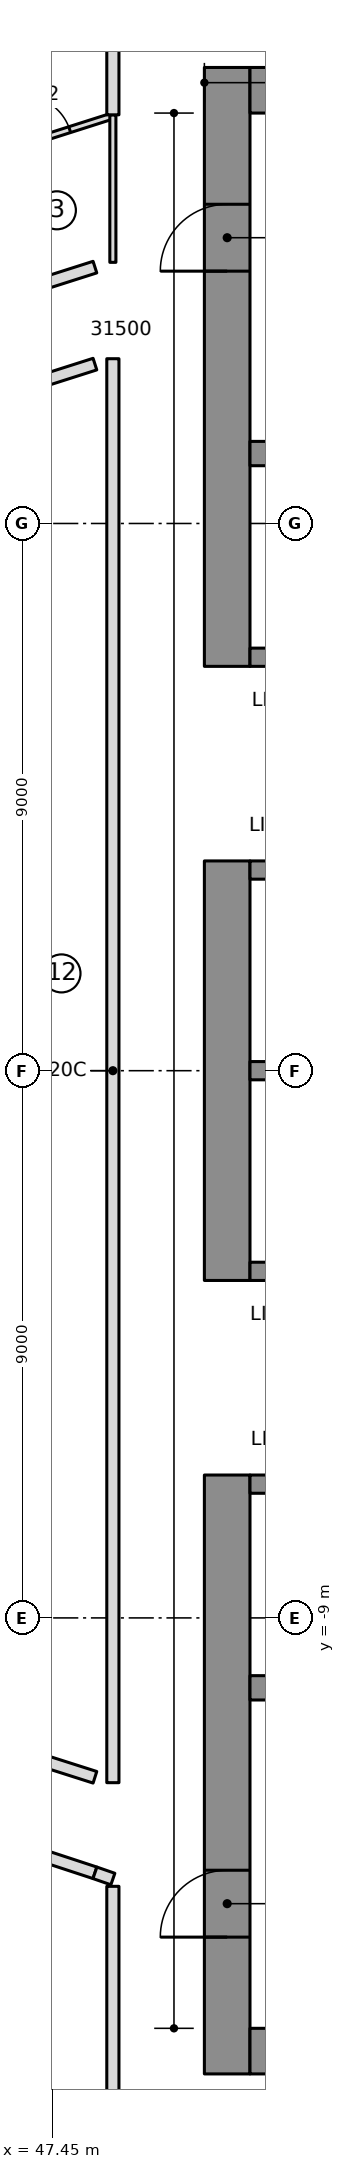
"""IFC4 building model, lengths in metres.
Left out: names, types, materials, properties, quantities, classifications, styles, units other than length and angle.
Written with IfcOpenShell. Run it as: python <this file> out.ifc"""

import sys

from ifc_helpers import new_model, si_unit, direction, frame, frame_2d, origin, place, context, subcontext, project, spatial, rectangle, extrude, element, fill, save


model = new_model("IFC4")
c1 = context("Model", 3, precision=1e-05, world=origin(), true_north=direction((0.0, 1.0)))
c2 = subcontext(c1, "Body", "Model", "MODEL_VIEW")
j1 = project(units=[si_unit("LENGTHUNIT", "METRE"), si_unit("PLANEANGLEUNIT", "RADIAN")], contexts=[c1])
p1 = place(None, origin())
s1 = spatial("IfcSite", under=j1, at=p1, CompositionType="ELEMENT")
p2 = place(p1, origin())
s2 = spatial("IfcBuilding", under=s1, at=p2, CompositionType="ELEMENT")
p3 = place(p2, frame((0.0, 0.0, 175.5)))
s3 = spatial("IfcBuildingStorey", under=s2, at=p3, CompositionType="ELEMENT", Elevation=175.5)
p4 = place(p3, frame((50.325, 6.65, 0.0), z_axis=(0.0, 0.0, 1.0), x_axis=(0.0, 1.0, 0.0)))
e1 = element("IfcWall", 1, at=p4, inside=s3, PredefinedType="SHEAR", context=c2, shape_type="SweptSolid", body=[
    extrude(rectangle(XDim=9.85, YDim=0.75, at=frame_2d((4.925, 0.0))), origin(), (0.0, 0.0, 1.0), 3.55),
])
p5 = place(p4, frame((6.5, 0.0, 0.0)))
e2 = element("IfcOpeningElement", 2, at=p5, cuts=e1, PredefinedType="OPENING", context=c2, shape_type="SweptSolid", body=[
    extrude(rectangle(XDim=1.1, YDim=2.1, at=frame_2d((0.55, 1.05))), frame((0.0, 0.385, 0.0), z_axis=(0.0, -1.0, 0.0), x_axis=(1.0, 0.0, 0.0)), (0.0, 0.0, 1.0), 0.77),
])
p6 = place(p3, frame((50.325, -3.45, 0.0), z_axis=(0.0, 0.0, 1.0), x_axis=(0.0, 1.0, 0.0)))
e3 = element("IfcWall", 3, at=p6, inside=s3, PredefinedType="SHEAR", context=c2, shape_type="SweptSolid", body=[
    extrude(rectangle(XDim=6.9, YDim=0.75, at=frame_2d((3.45, 0.0))), origin(), (0.0, 0.0, 1.0), 3.55),
])
p7 = place(p3, frame((50.325, -16.5, 0.0), z_axis=(0.0, 0.0, 1.0), x_axis=(0.0, 1.0, 0.0)))
e4 = element("IfcWall", 4, at=p7, inside=s3, PredefinedType="SHEAR", context=c2, shape_type="SweptSolid", body=[
    extrude(rectangle(XDim=9.85, YDim=0.75, at=frame_2d((4.925, 0.0))), origin(), (0.0, 0.0, 1.0), 3.55),
])
p8 = place(p7, frame((2.25, 0.0, 0.0)))
e5 = element("IfcOpeningElement", 5, at=p8, cuts=e4, PredefinedType="OPENING", context=c2, shape_type="SweptSolid", body=[
    extrude(rectangle(XDim=1.1, YDim=2.1, at=frame_2d((0.55, 1.05))), frame((0.0, 0.385, 0.0), z_axis=(0.0, -1.0, 0.0), x_axis=(1.0, 0.0, 0.0)), (0.0, 0.0, 1.0), 0.77),
])
for number, where, z_axis, x_axis in (
    (6, (50.7, 16.125, 0.0), (0.0, 0.0, 1.0), (1.0, 0.0, 0.0)),
    (7, (50.7, -16.125, 0.0), (0.0, 0.0, 1.0), (1.0, 0.0, 0.0)),
):
    element("IfcWall", number, at=place(p3, frame(where, z_axis=z_axis, x_axis=x_axis)), inside=s3, PredefinedType="SHEAR", context=c2, shape_type="SweptSolid", body=[
        extrude(rectangle(XDim=13.77, YDim=0.75, at=frame_2d((6.885, 0.0))), origin(), (0.0, 0.0, 1.0), 3.55),
    ])
p9 = place(p3, frame((50.7, 10.15, 0.0), z_axis=(0.0, 0.0, 1.0), x_axis=(1.0, 0.0, 0.0)))
e8 = element("IfcWall", 8, at=p9, inside=s3, PredefinedType="SHEAR", context=c2, shape_type="SweptSolid", body=[
    extrude(rectangle(XDim=13.02, YDim=0.4, at=frame_2d((6.51, 0.0))), origin(), (0.0, 0.0, 1.0), 3.55),
])
p10 = place(p9, frame((0.7, 0.0, 0.0)))
e9 = element("IfcOpeningElement", 9, at=p10, cuts=e8, PredefinedType="OPENING", context=c2, shape_type="SweptSolid", body=[
    extrude(rectangle(XDim=1.1, YDim=2.1, at=frame_2d((0.55, 1.05))), frame((0.0, 0.21, 0.0), z_axis=(0.0, -1.0, 0.0), x_axis=(1.0, 0.0, 0.0)), (0.0, 0.0, 1.0), 0.42),
])
p11 = place(p9, frame((3.5, 0.0, 0.0)))
e10 = element("IfcOpeningElement", 10, at=p11, cuts=e8, PredefinedType="OPENING", context=c2, shape_type="SweptSolid", body=[
    extrude(rectangle(XDim=1.1, YDim=2.1, at=frame_2d((0.55, 1.05))), frame((0.0, 0.21, 0.0), z_axis=(0.0, -1.0, 0.0), x_axis=(1.0, 0.0, 0.0)), (0.0, 0.0, 1.0), 0.42),
])
p12 = place(p3, frame((50.7, -10.15, 0.0), z_axis=(0.0, 0.0, 1.0), x_axis=(1.0, 0.0, 0.0)))
e11 = element("IfcWall", 11, at=p12, inside=s3, PredefinedType="SHEAR", context=c2, shape_type="SweptSolid", body=[
    extrude(rectangle(XDim=13.02, YDim=0.4, at=frame_2d((6.51, 0.0))), origin(), (0.0, 0.0, 1.0), 3.55),
])
p13 = place(p3, frame((50.7, 0.0, 0.0), z_axis=(0.0, 0.0, 1.0), x_axis=(1.0, 0.0, 0.0)))
e12 = element("IfcWall", 12, at=p13, inside=s3, PredefinedType="SHEAR", context=c2, shape_type="SweptSolid", body=[
    extrude(rectangle(XDim=10.9, YDim=0.3, at=frame_2d((5.45, 0.0))), origin(), (0.0, 0.0, 1.0), 3.55),
])
p14 = place(p3, frame((50.7, 3.3, 0.0), z_axis=(0.0, 0.0, 1.0), x_axis=(1.0, 0.0, 0.0)))
e13 = element("IfcWall", 13, at=p14, inside=s3, PredefinedType="SHEAR", context=c2, shape_type="SweptSolid", body=[
    extrude(rectangle(XDim=10.9, YDim=0.3, at=frame_2d((5.45, 0.0))), origin(), (0.0, 0.0, 1.0), 3.55),
])
p15 = place(p14, frame((0.7, 0.0, 0.0)))
e14 = element("IfcOpeningElement", 14, at=p15, cuts=e13, PredefinedType="OPENING", context=c2, shape_type="SweptSolid", body=[
    extrude(rectangle(XDim=1.1, YDim=2.1, at=frame_2d((0.55, 1.05))), frame((0.0, 0.16, 0.0), z_axis=(0.0, -1.0, 0.0), x_axis=(1.0, 0.0, 0.0)), (0.0, 0.0, 1.0), 0.32),
])
p16 = place(p14, frame((3.5, 0.0, 0.0)))
e15 = element("IfcOpeningElement", 15, at=p16, cuts=e13, PredefinedType="OPENING", context=c2, shape_type="SweptSolid", body=[
    extrude(rectangle(XDim=1.1, YDim=2.1, at=frame_2d((0.55, 1.05))), frame((0.0, 0.16, 0.0), z_axis=(0.0, -1.0, 0.0), x_axis=(1.0, 0.0, 0.0)), (0.0, 0.0, 1.0), 0.32),
])
p17 = place(p14, frame((6.3, 0.0, 0.0)))
e16 = element("IfcOpeningElement", 16, at=p17, cuts=e13, PredefinedType="OPENING", context=c2, shape_type="SweptSolid", body=[
    extrude(rectangle(XDim=1.1, YDim=2.1, at=frame_2d((0.55, 1.05))), frame((0.0, 0.16, 0.0), z_axis=(0.0, -1.0, 0.0), x_axis=(1.0, 0.0, 0.0)), (0.0, 0.0, 1.0), 0.32),
])
p18 = place(p14, frame((9.1, 0.0, 0.0)))
e17 = element("IfcOpeningElement", 17, at=p18, cuts=e13, PredefinedType="OPENING", context=c2, shape_type="SweptSolid", body=[
    extrude(rectangle(XDim=1.1, YDim=2.1, at=frame_2d((0.55, 1.05))), frame((0.0, 0.16, 0.0), z_axis=(0.0, -1.0, 0.0), x_axis=(1.0, 0.0, 0.0)), (0.0, 0.0, 1.0), 0.32),
])
p19 = place(p3, frame((50.7, 6.8, 0.0), z_axis=(0.0, 0.0, 1.0), x_axis=(1.0, 0.0, 0.0)))
e18 = element("IfcWall", 18, at=p19, inside=s3, PredefinedType="SHEAR", context=c2, shape_type="SweptSolid", body=[
    extrude(rectangle(XDim=10.9, YDim=0.3, at=frame_2d((5.45, 0.0))), origin(), (0.0, 0.0, 1.0), 3.55),
])
p20 = place(p3, frame((50.7, -3.3, 0.0), z_axis=(0.0, 0.0, 1.0), x_axis=(1.0, 0.0, 0.0)))
e19 = element("IfcWall", 19, at=p20, inside=s3, PredefinedType="SHEAR", context=c2, shape_type="SweptSolid", body=[
    extrude(rectangle(XDim=10.9, YDim=0.3, at=frame_2d((5.45, 0.0))), origin(), (0.0, 0.0, 1.0), 3.55),
])
p21 = place(p20, frame((9.1, 0.0, 0.0)))
e20 = element("IfcOpeningElement", 20, at=p21, cuts=e19, PredefinedType="OPENING", context=c2, shape_type="SweptSolid", body=[
    extrude(rectangle(XDim=1.1, YDim=2.1, at=frame_2d((0.55, 1.05))), frame((0.0, 0.16, 0.0), z_axis=(0.0, -1.0, 0.0), x_axis=(1.0, 0.0, 0.0)), (0.0, 0.0, 1.0), 0.32),
])
p22 = place(p3, frame((50.7, -6.8, 0.0), z_axis=(0.0, 0.0, 1.0), x_axis=(1.0, 0.0, 0.0)))
e21 = element("IfcWall", 21, at=p22, inside=s3, PredefinedType="SHEAR", context=c2, shape_type="SweptSolid", body=[
    extrude(rectangle(XDim=10.9, YDim=0.3, at=frame_2d((5.45, 0.0))), origin(), (0.0, 0.0, 1.0), 3.55),
])
p23 = place(p22, frame((6.3, 0.0, 0.0)))
e22 = element("IfcOpeningElement", 22, at=p23, cuts=e21, PredefinedType="OPENING", context=c2, shape_type="SweptSolid", body=[
    extrude(rectangle(XDim=1.1, YDim=2.1, at=frame_2d((0.55, 1.05))), frame((0.0, 0.16, 0.0), z_axis=(0.0, -1.0, 0.0), x_axis=(1.0, 0.0, 0.0)), (0.0, 0.0, 1.0), 0.32),
])
p24 = place(p22, frame((9.1, 0.0, 0.0)))
e23 = element("IfcOpeningElement", 23, at=p24, cuts=e21, PredefinedType="OPENING", context=c2, shape_type="SweptSolid", body=[
    extrude(rectangle(XDim=1.1, YDim=2.1, at=frame_2d((0.55, 1.05))), frame((0.0, 0.16, 0.0), z_axis=(0.0, -1.0, 0.0), x_axis=(1.0, 0.0, 0.0)), (0.0, 0.0, 1.0), 0.32),
])
p25 = place(p3, frame((46.259, 15.007, 0.0), z_axis=(0.0, 0.0, 1.0), x_axis=(0.952731222045, 0.303814447552, 0.0)))
e24 = element("IfcWall", 24, at=p25, inside=s3, PredefinedType="PARTITIONING", context=c2, shape_type="SweptSolid", body=[
    extrude(rectangle(XDim=2.277, YDim=0.1, at=frame_2d((1.138, 0.0))), origin(), (0.0, 0.0, 1.0), 3.25),
])
p26 = place(p25, frame((0.75, 0.0, 0.0)))
e25 = element("IfcOpeningElement", 25, at=p26, cuts=e24, PredefinedType="OPENING", context=c2, shape_type="SweptSolid", body=[
    extrude(rectangle(XDim=0.8, YDim=2.1, at=frame_2d((0.4, 1.05))), frame((0.0, 0.06, 0.0), z_axis=(0.0, -1.0, 0.0), x_axis=(1.0, 0.0, 0.0)), (0.0, 0.0, 1.0), 0.12),
])
p27 = place(p3, frame((48.445, 15.721, 0.0), z_axis=(0.0, 0.0, 1.0), x_axis=(0.0, -1.0, 0.0)))
e26 = element("IfcWall", 26, at=p27, inside=s3, PredefinedType="PARTITIONING", context=c2, shape_type="SweptSolid", body=[
    extrude(rectangle(XDim=2.426, YDim=0.1, at=frame_2d((1.213, 0.0))), origin(), (0.0, 0.0, 1.0), 3.25),
])
p28 = place(p3, frame((48.15, 13.217, 0.0), z_axis=(0.0, 0.0, 1.0), x_axis=(-0.952731090451, -0.303814860215, 0.0)))
e27 = element("IfcWall", 27, at=p28, inside=s3, PredefinedType="PARTITIONING", context=c2, shape_type="SweptSolid", body=[
    extrude(rectangle(XDim=1.088, YDim=0.2, at=frame_2d((0.544, 0.0))), origin(), (0.0, 0.0, 1.0), 3.25),
])
p29 = place(p3, frame((43.026, -11.507, 0.0), z_axis=(0.0, 0.0, 1.0), x_axis=(0.949951949432, -0.312396052744, 0.0)))
e28 = element("IfcWall", 28, at=p29, inside=s3, PredefinedType="PARTITIONING", context=c2, shape_type="SweptSolid", body=[
    extrude(rectangle(XDim=5.394, YDim=0.2, at=frame_2d((2.697, 0.0))), origin(), (0.0, 0.0, 1.0), 3.25),
])
p30 = place(p29, frame((3.05, 0.0, 0.0)))
e29 = element("IfcOpeningElement", 29, at=p30, cuts=e28, PredefinedType="OPENING", context=c2, shape_type="SweptSolid", body=[
    extrude(rectangle(XDim=1.0, YDim=2.1, at=frame_2d((0.5, 1.05))), frame((0.0, 0.11, 0.0), z_axis=(0.0, -1.0, 0.0), x_axis=(1.0, 0.0, 0.0)), (0.0, 0.0, 1.0), 0.22),
])
for number, where, z_axis, x_axis in (
    (30, (46.881, 11.217, 0.0), (0.0, 0.0, 1.0), (0.953, 0.304, 0.0)),
    (31, (48.15, -11.621, 0.0), (0.0, 0.0, 1.0), (-0.953, 0.304, 0.0)),
):
    element("IfcWall", number, at=place(p3, frame(where, z_axis=z_axis, x_axis=x_axis)), inside=s3, PredefinedType="PARTITIONING", context=c2, shape_type="SweptSolid", body=[
        extrude(rectangle(XDim=1.332, YDim=0.2, at=frame_2d((0.666, 0.0))), origin(), (0.0, 0.0, 1.0), 3.25),
    ])
p31 = place(p3, frame((48.445, 20.352, 0.0), z_axis=(0.0, 0.0, 1.0), x_axis=(-5.2725931e-05, -0.99999999861, 0.0)))
e32 = element("IfcWall", 32, at=p31, inside=s3, PredefinedType="PARTITIONING", context=c2, shape_type="SweptSolid", body=[
    extrude(rectangle(XDim=4.63, YDim=0.2, at=frame_2d((2.315, 0.0))), origin(), (0.0, 0.0, 1.0), 3.25),
])
p32 = place(p31, frame((1.815, 0.0, 0.0)))
e33 = element("IfcOpeningElement", 33, at=p32, cuts=e32, PredefinedType="OPENING", context=c2, shape_type="SweptSolid", body=[
    extrude(rectangle(XDim=1.0, YDim=2.1, at=frame_2d((0.5, 1.05))), frame((0.0, 0.11, 0.0), z_axis=(0.0, -1.0, 0.0), x_axis=(1.0, 0.0, 0.0)), (0.0, 0.0, 1.0), 0.22),
])
p33 = place(p3, frame((48.445, 11.71, 0.0), z_axis=(0.0, 0.0, 1.0), x_axis=(0.0, -1.0, 0.0)))
e34 = element("IfcWall", 34, at=p33, inside=s3, PredefinedType="PARTITIONING", context=c2, shape_type="SweptSolid", body=[
    extrude(rectangle(XDim=23.42, YDim=0.2, at=frame_2d((11.71, 0.0))), origin(), (0.0, 0.0, 1.0), 3.25),
])
p34 = place(p3, frame((48.15, -13.192, 0.0), z_axis=(0.0, 0.0, 1.0), x_axis=(0.944623214561, -0.328156947987, 0.0)))
e35 = element("IfcWall", 35, at=p34, inside=s3, PredefinedType="PARTITIONING", context=c2, shape_type="SweptSolid", body=[
    extrude(rectangle(XDim=0.312, YDim=0.2, at=frame_2d((0.156, 0.0))), origin(), (0.0, 0.0, 1.0), 3.25),
])
p35 = place(p3, frame((48.445, -13.415, 0.0), z_axis=(0.0, 0.0, 1.0), x_axis=(3.5195157e-05, -0.999999999381, 0.0)))
e36 = element("IfcWall", 36, at=p35, inside=s3, PredefinedType="PARTITIONING", context=c2, shape_type="SweptSolid", body=[
    extrude(rectangle(XDim=6.937, YDim=0.2, at=frame_2d((3.468, 0.0))), origin(), (0.0, 0.0, 1.0), 3.25),
])
p36 = place(p26, origin())
e37 = element("IfcDoor", 37, at=p36, inside=s3, OperationType="SINGLE_SWING_LEFT", PredefinedType="DOOR", context=c2, shape_type="SweptSolid", body=[
    extrude(rectangle(XDim=0.8, YDim=2.1, at=frame_2d((0.4, 1.05))), frame((0.0, 0.025, 0.0), z_axis=(0.0, -1.0, 0.0), x_axis=(1.0, 0.0, 0.0)), (0.0, 0.0, 1.0), 0.05),
])
fill(e25, e37)
p37 = place(p5, origin())
e38 = element("IfcDoor", 38, at=p37, inside=s3, OperationType="SINGLE_SWING_RIGHT", PredefinedType="DOOR", context=c2, shape_type="SweptSolid", body=[
    extrude(rectangle(XDim=1.1, YDim=2.1, at=frame_2d((0.55, 1.05))), frame((0.0, 0.025, 0.0), z_axis=(0.0, -1.0, 0.0), x_axis=(1.0, 0.0, 0.0)), (0.0, 0.0, 1.0), 0.05),
])
fill(e2, e38)
p38 = place(p8, origin())
e39 = element("IfcDoor", 39, at=p38, inside=s3, OperationType="SINGLE_SWING_RIGHT", PredefinedType="DOOR", context=c2, shape_type="SweptSolid", body=[
    extrude(rectangle(XDim=1.1, YDim=2.1, at=frame_2d((0.55, 1.05))), frame((0.0, 0.025, 0.0), z_axis=(0.0, -1.0, 0.0), x_axis=(1.0, 0.0, 0.0)), (0.0, 0.0, 1.0), 0.05),
])
fill(e5, e39)
save(model, sys.argv[1])
